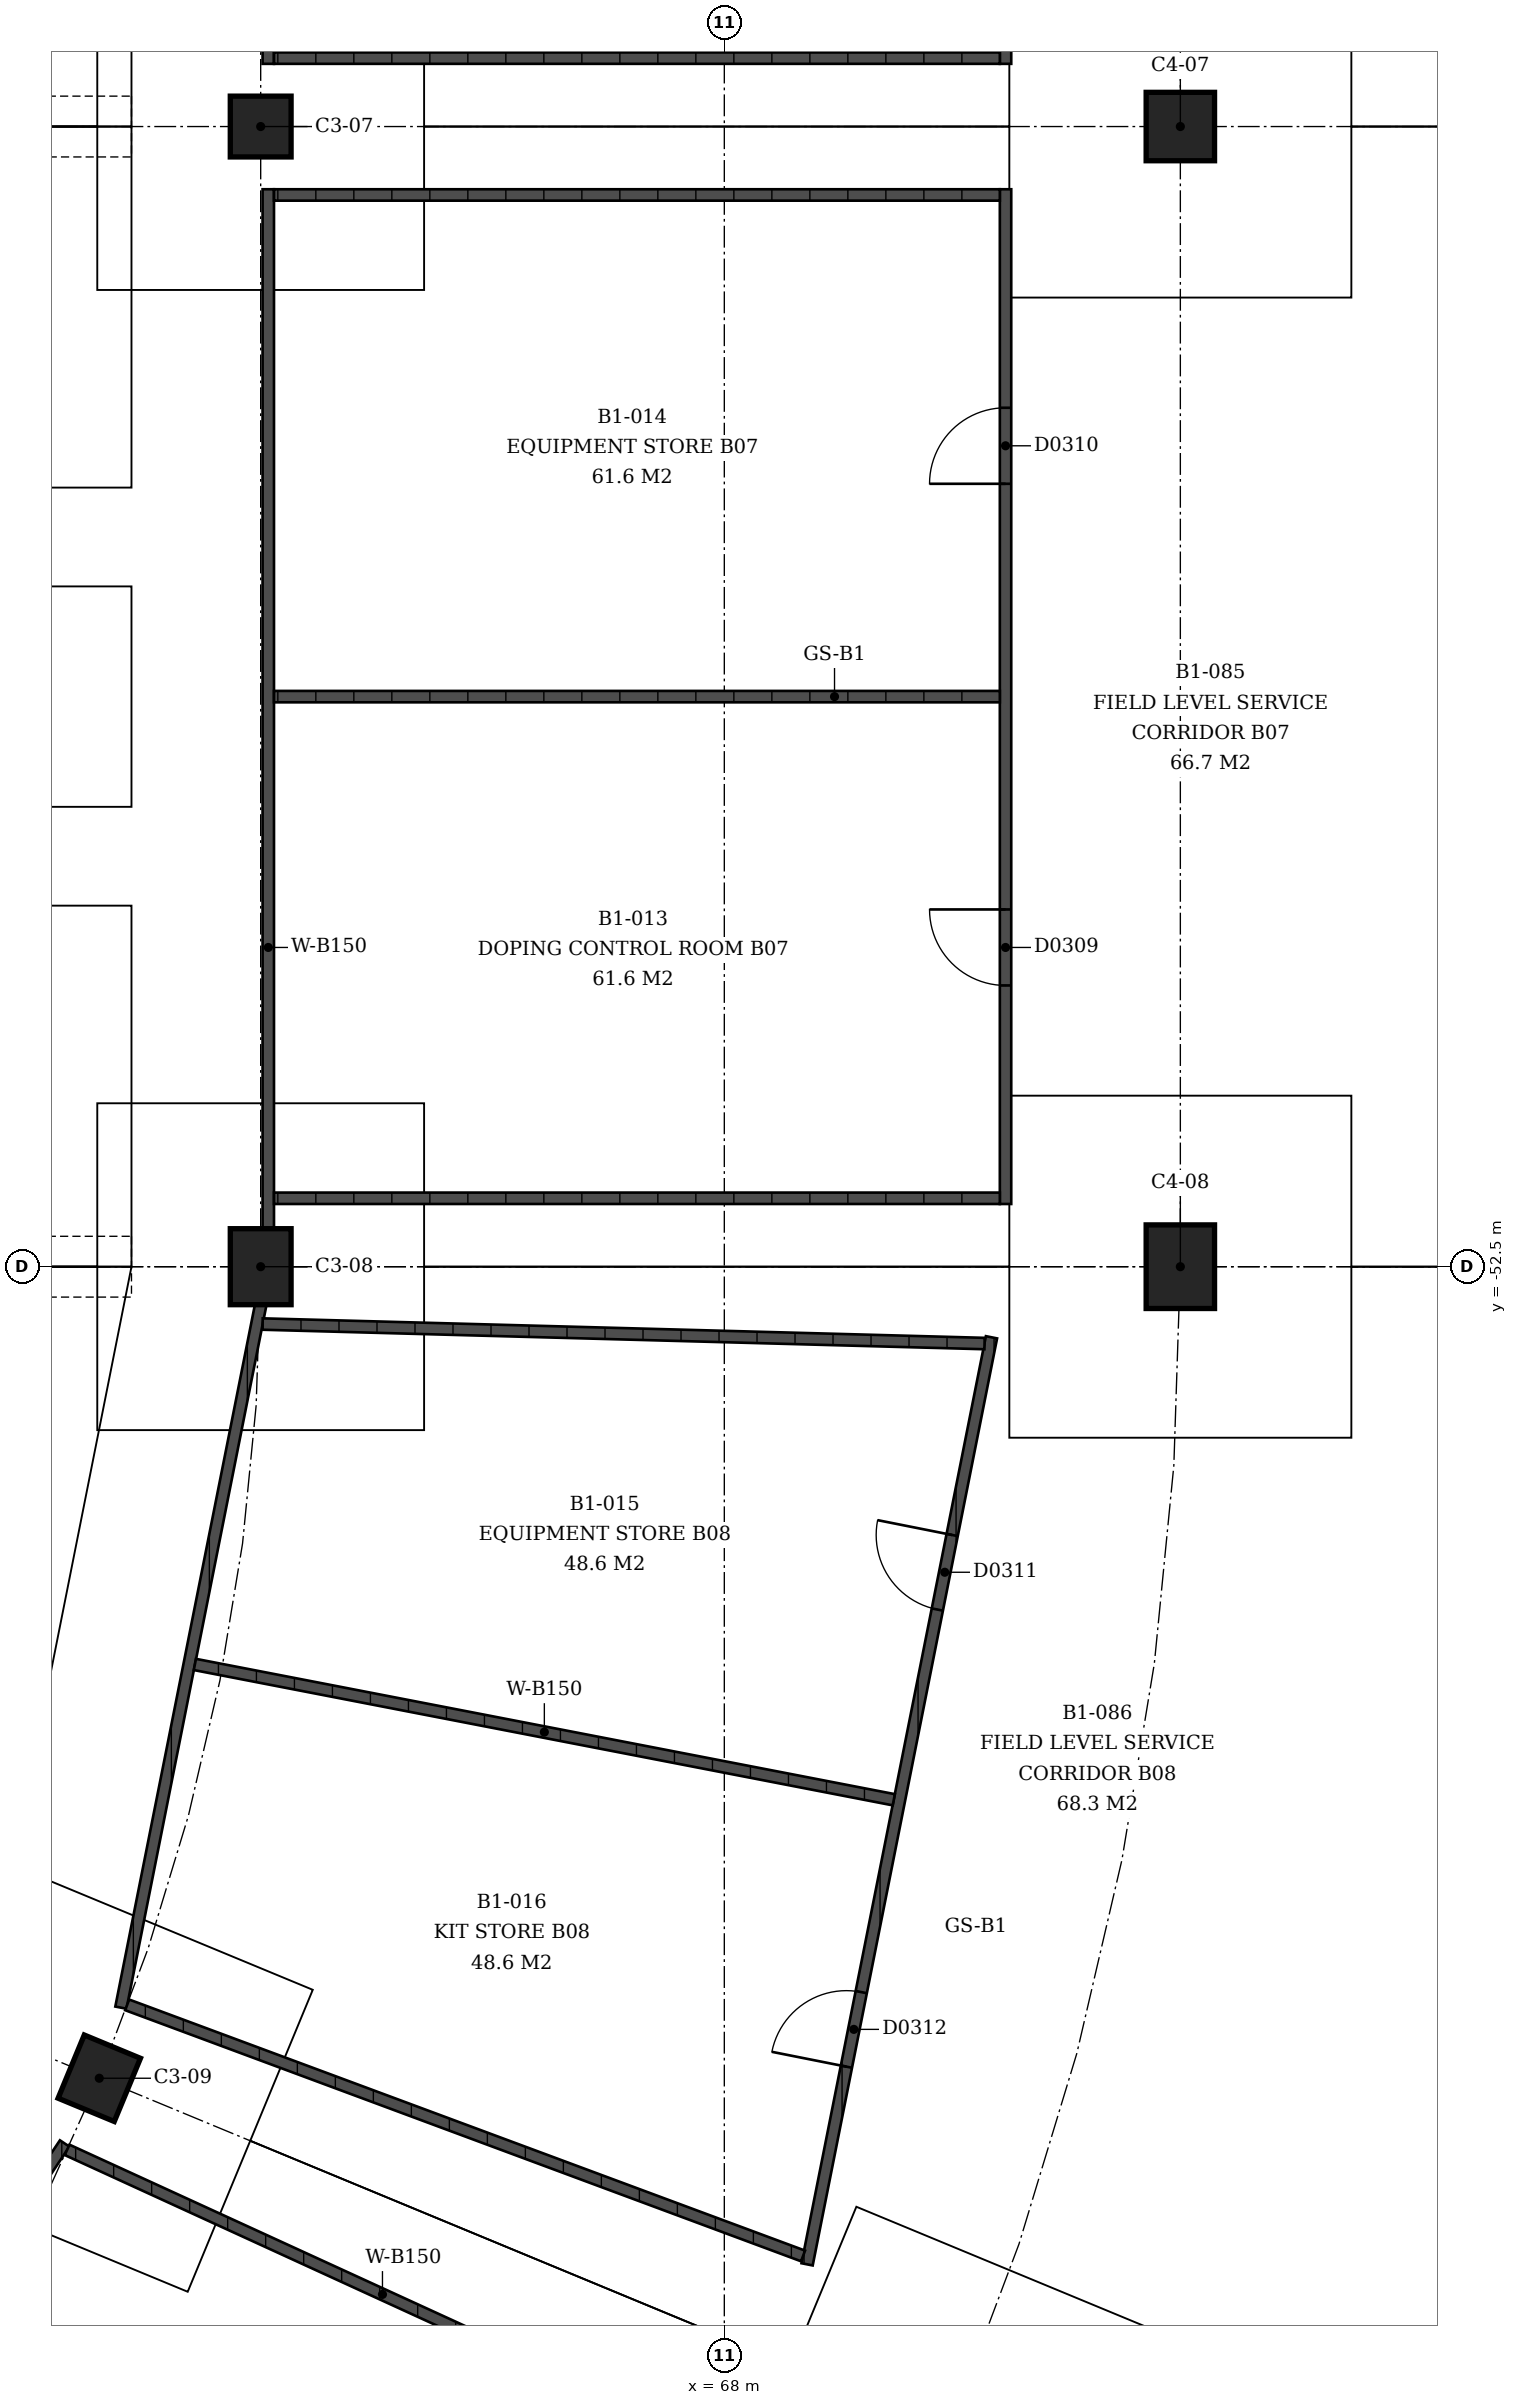
"""IFC4 building model, lengths in metres.
Left out: names, types, materials, properties, quantities, classifications, styles, units other than length and angle.
Written with IfcOpenShell. Run it as: python <this file> out.ifc"""

import sys

from ifc_helpers import new_model, si_unit, direction, frame, frame_2d, origin, origin_2d, place, context, subcontext, project, spatial, rectangle, extrude, element, fill, save


model = new_model("IFC4")
c1 = context("Model", 3, precision=1e-05, world=origin(), true_north=direction((0.0, 1.0)))
c2 = subcontext(c1, "Body", "Model", "MODEL_VIEW")
j1 = project(units=[si_unit("LENGTHUNIT", "METRE"), si_unit("PLANEANGLEUNIT", "RADIAN")], contexts=[c1])
p1 = place(None, origin())
s1 = spatial("IfcSite", under=j1, at=p1, CompositionType="ELEMENT")
p2 = place(p1, origin())
s2 = spatial("IfcBuilding", under=s1, at=p2, CompositionType="ELEMENT")
p3 = place(p2, frame((0.0, 0.0, -4.5)))
s3 = spatial("IfcBuildingStorey", under=s2, at=p3, CompositionType="ELEMENT", Elevation=-4.5)
p4 = place(p3, frame((61.9, -37.5, 0.0), z_axis=(0.0, 0.0, 1.0), x_axis=(0.0, 1.0, 0.0)))
e1 = element("IfcColumn", 1, at=p4, inside=s3, PredefinedType="COLUMN", context=c2, shape_type="SweptSolid", body=[
    extrude(rectangle(XDim=0.8, YDim=0.8, at=origin_2d()), origin(), (0.0, 0.0, 1.0), 4.5),
])
p5 = place(p3, frame((74.0, -37.5, 0.0), z_axis=(0.0, 0.0, 1.0), x_axis=(0.0, 1.0, 0.0)))
e2 = element("IfcColumn", 2, at=p5, inside=s3, PredefinedType="COLUMN", context=c2, shape_type="SweptSolid", body=[
    extrude(rectangle(XDim=0.9, YDim=0.9, at=origin_2d()), origin(), (0.0, 0.0, 1.0), 4.5),
])
p6 = place(p3, frame((61.9, -52.5, 0.0), z_axis=(0.0, 0.0, 1.0), x_axis=(0.0, 1.0, 0.0)))
e3 = element("IfcColumn", 3, at=p6, inside=s3, PredefinedType="COLUMN", context=c2, shape_type="SweptSolid", body=[
    extrude(rectangle(XDim=1.0, YDim=0.8, at=origin_2d()), origin(), (0.0, 0.0, 1.0), 4.5),
])
p7 = place(p3, frame((74.0, -52.5, 0.0), z_axis=(0.0, 0.0, 1.0), x_axis=(0.0, 1.0, 0.0)))
e4 = element("IfcColumn", 4, at=p7, inside=s3, PredefinedType="COLUMN", context=c2, shape_type="SweptSolid", body=[
    extrude(rectangle(XDim=1.1, YDim=0.9, at=origin_2d()), origin(), (0.0, 0.0, 1.0), 4.5),
])
p8 = place(p3, frame((59.776, -63.177, 0.0), z_axis=(0.0, 0.0, 1.0), x_axis=(0.382683432365, 0.923879532511, 0.0)))
e5 = element("IfcColumn", 5, at=p8, inside=s3, PredefinedType="COLUMN", context=c2, shape_type="SweptSolid", body=[
    extrude(rectangle(XDim=0.9, YDim=0.8, at=origin_2d()), origin(), (0.0, 0.0, 1.0), 4.5),
])
p9 = place(p3, frame((62.0, -23.0, 0.0), z_axis=(0.0, 0.0, 1.0), x_axis=(0.0, -1.0, 0.0)))
e6 = element("IfcWall", 6, at=p9, inside=s3, PredefinedType="SOLIDWALL", context=c2, shape_type="SweptSolid", body=[
    extrude(rectangle(XDim=13.675, YDim=0.15, at=frame_2d((6.837, 0.0))), origin(), (0.0, 0.0, 1.0), 3.0),
])
p10 = place(p3, frame((71.7, -23.325, 0.0), z_axis=(0.0, 0.0, 1.0), x_axis=(0.0, -1.0, 0.0)))
e7 = element("IfcWall", 7, at=p10, inside=s3, PredefinedType="SOLIDWALL", context=c2, shape_type="SweptSolid", body=[
    extrude(rectangle(XDim=13.35, YDim=0.15, at=frame_2d((6.675, 0.0))), origin(), (0.0, 0.0, 1.0), 3.0),
])
p11 = place(p10, frame((2.875, 0.0, 0.0)))
e8 = element("IfcOpeningElement", 8, at=p11, cuts=e7, PredefinedType="OPENING", context=c2, shape_type="SweptSolid", body=[
    extrude(rectangle(XDim=1.0, YDim=2.1, at=frame_2d((0.5, 1.05))), frame((0.0, 0.075, 0.0), z_axis=(0.0, -1.0, 0.0), x_axis=(1.0, 0.0, 0.0)), (0.0, 0.0, 1.0), 0.15),
])
p12 = place(p10, frame((9.475, 0.0, 0.0)))
e9 = element("IfcOpeningElement", 9, at=p12, cuts=e7, PredefinedType="OPENING", context=c2, shape_type="SweptSolid", body=[
    extrude(rectangle(XDim=1.0, YDim=2.1, at=frame_2d((0.5, 1.05))), frame((0.0, 0.075, 0.0), z_axis=(0.0, -1.0, 0.0), x_axis=(1.0, 0.0, 0.0)), (0.0, 0.0, 1.0), 0.15),
])
p13 = place(p3, frame((62.075, -36.6, 0.0), z_axis=(0.0, 0.0, 1.0), x_axis=(1.0, 0.0, 0.0)))
e10 = element("IfcWall", 10, at=p13, inside=s3, PredefinedType="SOLIDWALL", context=c2, shape_type="SweptSolid", body=[
    extrude(rectangle(XDim=9.55, YDim=0.15, at=frame_2d((4.775, 0.0))), origin(), (0.0, 0.0, 1.0), 3.0),
])
p14 = place(p3, frame((62.0, -52.0, 0.0), z_axis=(0.0, 0.0, 1.0), x_axis=(0.0, 1.0, 0.0)))
e11 = element("IfcWall", 11, at=p14, inside=s3, PredefinedType="SOLIDWALL", context=c2, shape_type="SweptSolid", body=[
    extrude(rectangle(XDim=13.675, YDim=0.15, at=frame_2d((6.837, 0.0))), origin(), (0.0, 0.0, 1.0), 3.0),
])
p15 = place(p3, frame((71.7, -51.675, 0.0), z_axis=(0.0, 0.0, 1.0), x_axis=(0.0, 1.0, 0.0)))
e12 = element("IfcWall", 12, at=p15, inside=s3, PredefinedType="SOLIDWALL", context=c2, shape_type="SweptSolid", body=[
    extrude(rectangle(XDim=13.35, YDim=0.15, at=frame_2d((6.675, 0.0))), origin(), (0.0, 0.0, 1.0), 3.0),
])
p16 = place(p15, frame((2.875, 0.0, 0.0)))
e13 = element("IfcOpeningElement", 13, at=p16, cuts=e12, PredefinedType="OPENING", context=c2, shape_type="SweptSolid", body=[
    extrude(rectangle(XDim=1.0, YDim=2.1, at=frame_2d((0.5, 1.05))), frame((0.0, 0.075, 0.0), z_axis=(0.0, -1.0, 0.0), x_axis=(1.0, 0.0, 0.0)), (0.0, 0.0, 1.0), 0.15),
])
p17 = place(p15, frame((9.475, 0.0, 0.0)))
e14 = element("IfcOpeningElement", 14, at=p17, cuts=e12, PredefinedType="OPENING", context=c2, shape_type="SweptSolid", body=[
    extrude(rectangle(XDim=1.0, YDim=2.1, at=frame_2d((0.5, 1.05))), frame((0.0, 0.075, 0.0), z_axis=(0.0, -1.0, 0.0), x_axis=(1.0, 0.0, 0.0)), (0.0, 0.0, 1.0), 0.15),
])
for number, where, z_axis, x_axis in (
    (15, (62.075, -51.6, 0.0), (0.0, 0.0, 1.0), (1.0, 0.0, 0.0)),
    (16, (62.075, -45.0, 0.0), (0.0, 0.0, 1.0), (1.0, 0.0, 0.0)),
    (17, (62.075, -38.4, 0.0), (0.0, 0.0, 1.0), (1.0, 0.0, 0.0)),
):
    element("IfcWall", number, at=place(p3, frame(where, z_axis=z_axis, x_axis=x_axis)), inside=s3, PredefinedType="SOLIDWALL", context=c2, shape_type="SweptSolid", body=[
        extrude(rectangle(XDim=9.55, YDim=0.15, at=frame_2d((4.775, 0.0))), origin(), (0.0, 0.0, 1.0), 3.0),
    ])
p18 = place(p3, frame((61.901, -53.0, 0.0), z_axis=(0.0, 0.0, 1.0), x_axis=(-0.195090337241, -0.980785277375, 0.0)))
e18 = element("IfcWall", 18, at=p18, inside=s3, PredefinedType="SOLIDWALL", context=c2, shape_type="SweptSolid", body=[
    extrude(rectangle(XDim=9.429, YDim=0.15, at=frame_2d((4.715, 0.0))), origin(), (0.0, 0.0, 1.0), 3.0),
])
p19 = place(p3, frame((71.515, -53.429, 0.0), z_axis=(0.0, 0.0, 1.0), x_axis=(-0.19510797715, -0.980781768414, 0.0)))
e19 = element("IfcWall", 19, at=p19, inside=s3, PredefinedType="SOLIDWALL", context=c2, shape_type="SweptSolid", body=[
    extrude(rectangle(XDim=12.436, YDim=0.15, at=frame_2d((6.218, 0.0))), origin(), (0.0, 0.0, 1.0), 3.0),
])
p20 = place(p19, frame((2.652, 0.0, 0.0)))
e20 = element("IfcOpeningElement", 20, at=p20, cuts=e19, PredefinedType="OPENING", context=c2, shape_type="SweptSolid", body=[
    extrude(rectangle(XDim=1.0, YDim=2.1, at=frame_2d((0.5, 1.05))), frame((0.0, 0.075, 0.0), z_axis=(0.0, -1.0, 0.0), x_axis=(1.0, 0.0, 0.0)), (0.0, 0.0, 1.0), 0.15),
])
p21 = place(p19, frame((8.784, 0.0, 0.0)))
e21 = element("IfcOpeningElement", 21, at=p21, cuts=e19, PredefinedType="OPENING", context=c2, shape_type="SweptSolid", body=[
    extrude(rectangle(XDim=1.0, YDim=2.1, at=frame_2d((0.5, 1.05))), frame((0.0, 0.075, 0.0), z_axis=(0.0, -1.0, 0.0), x_axis=(1.0, 0.0, 0.0)), (0.0, 0.0, 1.0), 0.15),
])
p22 = place(p3, frame((61.925, -53.254, 0.0), z_axis=(0.0, 0.0, 1.0), x_axis=(0.999635344856, -0.027003283405, 0.0)))
e22 = element("IfcWall", 22, at=p22, inside=s3, PredefinedType="SOLIDWALL", context=c2, shape_type="SweptSolid", body=[
    extrude(rectangle(XDim=9.502, YDim=0.15, at=frame_2d((4.751, 0.0))), origin(), (0.0, 0.0, 1.0), 3.0),
])
p23 = place(p3, frame((61.034, -57.733, 0.0), z_axis=(0.0, 0.0, 1.0), x_axis=(0.98177592882, -0.190042167924, 0.0)))
e23 = element("IfcWall", 23, at=p23, inside=s3, PredefinedType="SOLIDWALL", context=c2, shape_type="SweptSolid", body=[
    extrude(rectangle(XDim=9.366, YDim=0.15, at=frame_2d((4.683, 0.0))), origin(), (0.0, 0.0, 1.0), 3.0),
])
p24 = place(p3, frame((60.143, -62.211, 0.0), z_axis=(0.0, 0.0, 1.0), x_axis=(0.937410871216, -0.348225298515, 0.0)))
e24 = element("IfcWall", 24, at=p24, inside=s3, PredefinedType="SOLIDWALL", context=c2, shape_type="SweptSolid", body=[
    extrude(rectangle(XDim=9.487, YDim=0.15, at=frame_2d((4.743, 0.0))), origin(), (0.0, 0.0, 1.0), 3.0),
])
p25 = place(p3, frame((54.054, -71.917, 0.0), z_axis=(0.0, 0.0, 1.0), x_axis=(0.555561621569, 0.831475366226, 0.0)))
e25 = element("IfcWall", 25, at=p25, inside=s3, PredefinedType="SOLIDWALL", context=c2, shape_type="SweptSolid", body=[
    extrude(rectangle(XDim=9.48, YDim=0.15, at=frame_2d((4.74, 0.0))), origin(), (0.0, 0.0, 1.0), 3.0),
])
p26 = place(p3, frame((59.353, -64.119, 0.0), z_axis=(0.0, 0.0, 1.0), x_axis=(0.909090408533, -0.416598882755, 0.0)))
e26 = element("IfcWall", 26, at=p26, inside=s3, PredefinedType="SOLIDWALL", context=c2, shape_type="SweptSolid", body=[
    extrude(rectangle(XDim=9.487, YDim=0.15, at=frame_2d((4.743, 0.0))), origin(), (0.0, 0.0, 1.0), 3.0),
])
p27 = place(p16, origin())
e27 = element("IfcDoor", 27, at=p27, inside=s3, OperationType="SINGLE_SWING_LEFT", PredefinedType="DOOR", context=c2, shape_type="SweptSolid", body=[
    extrude(rectangle(XDim=1.0, YDim=2.1, at=frame_2d((0.5, 1.05))), frame((0.0, 0.025, 0.0), z_axis=(0.0, -1.0, 0.0), x_axis=(1.0, 0.0, 0.0)), (0.0, 0.0, 1.0), 0.05),
])
fill(e13, e27)
p28 = place(p17, origin())
e28 = element("IfcDoor", 28, at=p28, inside=s3, OperationType="SINGLE_SWING_RIGHT", PredefinedType="DOOR", context=c2, shape_type="SweptSolid", body=[
    extrude(rectangle(XDim=1.0, YDim=2.1, at=frame_2d((0.5, 1.05))), frame((0.0, 0.025, 0.0), z_axis=(0.0, -1.0, 0.0), x_axis=(1.0, 0.0, 0.0)), (0.0, 0.0, 1.0), 0.05),
])
fill(e14, e28)
p29 = place(p20, origin())
e29 = element("IfcDoor", 29, at=p29, inside=s3, OperationType="SINGLE_SWING_LEFT", PredefinedType="DOOR", context=c2, shape_type="SweptSolid", body=[
    extrude(rectangle(XDim=1.0, YDim=2.1, at=frame_2d((0.5, 1.05))), frame((0.0, 0.025, 0.0), z_axis=(0.0, -1.0, 0.0), x_axis=(1.0, 0.0, 0.0)), (0.0, 0.0, 1.0), 0.05),
])
fill(e20, e29)
p30 = place(p21, origin())
e30 = element("IfcDoor", 30, at=p30, inside=s3, OperationType="SINGLE_SWING_RIGHT", PredefinedType="DOOR", context=c2, shape_type="SweptSolid", body=[
    extrude(rectangle(XDim=1.0, YDim=2.1, at=frame_2d((0.5, 1.05))), frame((0.0, 0.025, 0.0), z_axis=(0.0, -1.0, 0.0), x_axis=(1.0, 0.0, 0.0)), (0.0, 0.0, 1.0), 0.05),
])
fill(e21, e30)
save(model, sys.argv[1])
